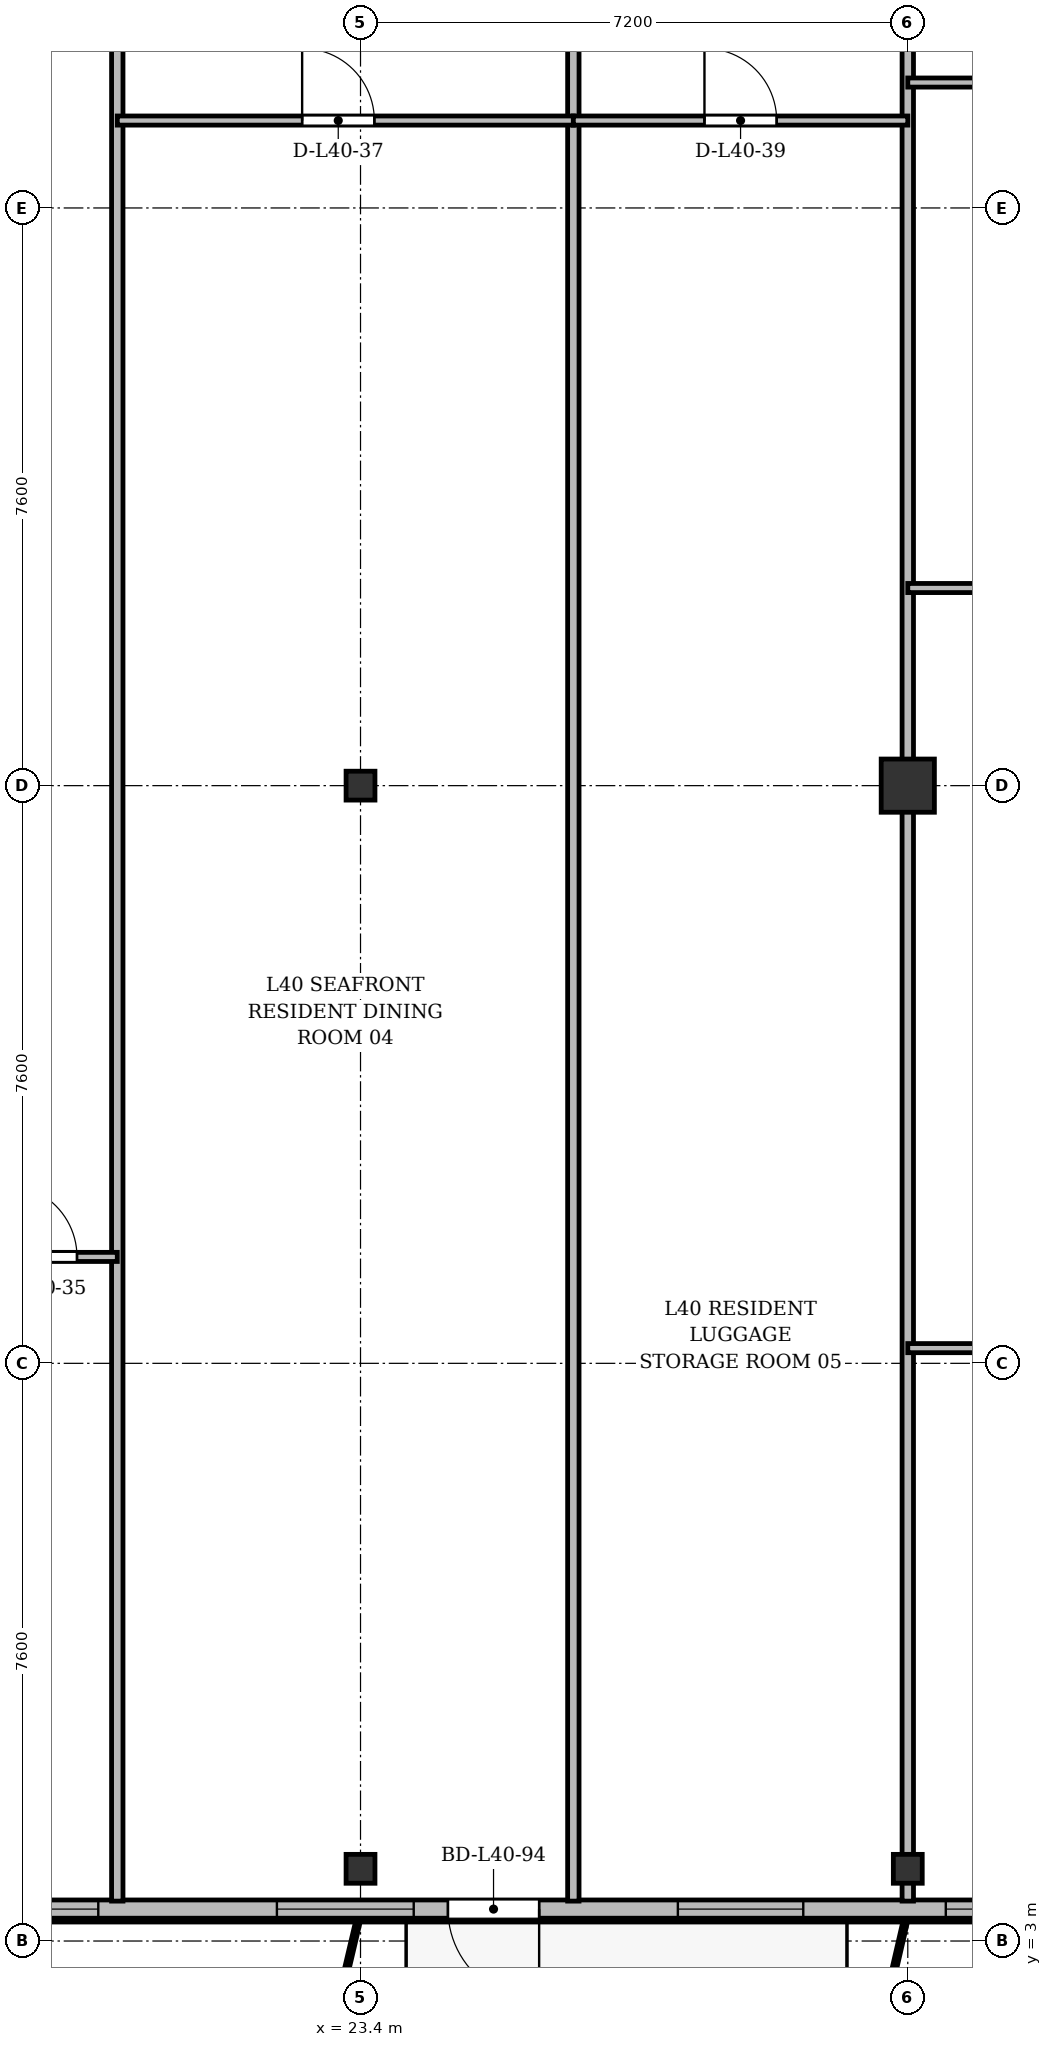
"""IFC4 building model, lengths in metres.
Left out: names, types, materials, properties, quantities, classifications, styles, units other than length and angle.
Written with IfcOpenShell. Run it as: python <this file> out.ifc"""

import sys

from ifc_helpers import new_model, si_unit, direction, frame, frame_2d, origin, origin_2d, place, context, subcontext, project, spatial, rectangle, i_section, extrude, source, transform, mapped, element, fill, save


model = new_model("IFC4")
c1 = context("Model", 3, precision=1e-05, world=origin(), true_north=direction((0.0, 1.0)))
c2 = subcontext(c1, "Body", "Model", "MODEL_VIEW")
j1 = project(units=[si_unit("LENGTHUNIT", "METRE"), si_unit("PLANEANGLEUNIT", "RADIAN")], contexts=[c1])
p1 = place(None, origin())
s1 = spatial("IfcSite", under=j1, at=p1, CompositionType="ELEMENT")
p2 = place(p1, origin())
s2 = spatial("IfcBuilding", under=s1, at=p2, CompositionType="ELEMENT")
p3 = place(p2, frame((0.0, 0.0, 153.7)))
s3 = spatial("IfcBuildingStorey", under=s2, at=p3, CompositionType="ELEMENT", Elevation=153.7)
m1 = source(origin(), c2, "Body", "SweptSolid", [
    extrude(i_section(OverallWidth=0.38, OverallDepth=0.38, WebThickness=0.02, FlangeThickness=0.03, at=origin_2d()), origin(), (0.0, 0.0, 1.0), 3.6),
])
for number, where, z_axis, x_axis in (
    (1, (23.4, 3.95, 0.0), (0.0, 0.0, 1.0), (1.0, 0.0, 0.0)),
    (2, (23.4, 18.2, 0.0), (0.0, 0.0, 1.0), (1.0, 0.0, 0.0)),
    (3, (30.6, 3.95, 0.0), (0.0, 0.0, 1.0), (1.0, 0.0, 0.0)),
):
    element("IfcColumn", number, at=place(p3, frame(where, z_axis=z_axis, x_axis=x_axis)), inside=s3, PredefinedType="COLUMN", context=c2, shape_type="MappedRepresentation", body=[
        mapped(m1, transform((0.0, 0.0, 0.0), x_axis=(1.0, 0.0, 0.0), y_axis=(0.0, 1.0, 0.0), z_axis=(0.0, 0.0, 1.0), scale=1.0)),
    ])
m2 = source(origin(), c2, "Body", "SweptSolid", [
    extrude(rectangle(XDim=0.7, YDim=0.7, at=origin_2d()), origin(), (0.0, 0.0, 1.0), 3.6),
])
p4 = place(p3, frame((30.6, 18.2, 0.0), z_axis=(0.0, 0.0, 1.0), x_axis=(1.0, 0.0, 0.0)))
e4 = element("IfcColumn", 4, at=p4, inside=s3, PredefinedType="COLUMN", context=c2, shape_type="MappedRepresentation", body=[
    mapped(m2, transform((0.0, 0.0, 0.0), x_axis=(1.0, 0.0, 0.0), y_axis=(0.0, 1.0, 0.0), z_axis=(0.0, 0.0, 1.0), scale=1.0)),
])
p5 = place(p3, frame((63.6, 3.42, 0.0), z_axis=(0.0, 0.0, 1.0), x_axis=(-1.0, 0.0, 0.0)))
e5 = element("IfcWall", 5, at=p5, inside=s3, PredefinedType="SOLIDWALL", context=c2, shape_type="SweptSolid", body=[
    extrude(rectangle(XDim=52.8, YDim=0.24, at=frame_2d((26.4, 0.0))), origin(), (0.0, 0.0, 1.0), 3.35),
])
p6 = place(p5, frame((0.295, 0.0, 0.9)))
e6 = element("IfcOpeningElement", 6, at=p6, cuts=e5, PredefinedType="OPENING", context=c2, shape_type="SweptSolid", body=[
    extrude(rectangle(XDim=1.5, YDim=1.75, at=frame_2d((0.75, 0.875))), frame((0.0, 0.13, 0.0), z_axis=(0.0, -1.0, 0.0), x_axis=(1.0, 0.0, 0.0)), (0.0, 0.0, 1.0), 0.26),
])
p7 = place(p5, frame((3.6, 0.0, 0.9)))
e7 = element("IfcOpeningElement", 7, at=p7, cuts=e5, PredefinedType="OPENING", context=c2, shape_type="SweptSolid", body=[
    extrude(rectangle(XDim=2.2, YDim=1.8, at=frame_2d((1.1, 0.9))), frame((0.0, 0.13, 0.0), z_axis=(0.0, -1.0, 0.0), x_axis=(1.0, 0.0, 0.0)), (0.0, 0.0, 1.0), 0.26),
])
p8 = place(p5, frame((7.635, 0.0, 0.0)))
e8 = element("IfcOpeningElement", 8, at=p8, cuts=e5, PredefinedType="OPENING", context=c2, shape_type="SweptSolid", body=[
    extrude(rectangle(XDim=1.2, YDim=2.2, at=frame_2d((0.6, 1.1))), frame((0.0, 0.13, 0.0), z_axis=(0.0, -1.0, 0.0), x_axis=(1.0, 0.0, 0.0)), (0.0, 0.0, 1.0), 0.26),
])
p9 = place(p5, frame((9.6, 0.0, 0.9)))
e9 = element("IfcOpeningElement", 9, at=p9, cuts=e5, PredefinedType="OPENING", context=c2, shape_type="SweptSolid", body=[
    extrude(rectangle(XDim=2.0, YDim=1.95, at=frame_2d((1.0, 0.975))), frame((0.0, 0.13, 0.0), z_axis=(0.0, -1.0, 0.0), x_axis=(1.0, 0.0, 0.0)), (0.0, 0.0, 1.0), 0.26),
])
p10 = place(p5, frame((12.175, 0.0, 0.9)))
e10 = element("IfcOpeningElement", 10, at=p10, cuts=e5, PredefinedType="OPENING", context=c2, shape_type="SweptSolid", body=[
    extrude(rectangle(XDim=1.65, YDim=1.85, at=frame_2d((0.825, 0.925))), frame((0.0, 0.13, 0.0), z_axis=(0.0, -1.0, 0.0), x_axis=(1.0, 0.0, 0.0)), (0.0, 0.0, 1.0), 0.26),
])
p11 = place(p5, frame((16.1, 0.0, 0.9)))
e11 = element("IfcOpeningElement", 11, at=p11, cuts=e5, PredefinedType="OPENING", context=c2, shape_type="SweptSolid", body=[
    extrude(rectangle(XDim=1.8, YDim=1.8, at=frame_2d((0.9, 0.9))), frame((0.0, 0.13, 0.0), z_axis=(0.0, -1.0, 0.0), x_axis=(1.0, 0.0, 0.0)), (0.0, 0.0, 1.0), 0.26),
])
p12 = place(p5, frame((22.3, 0.0, 0.9)))
e12 = element("IfcOpeningElement", 12, at=p12, cuts=e5, PredefinedType="OPENING", context=c2, shape_type="SweptSolid", body=[
    extrude(rectangle(XDim=2.2, YDim=1.8, at=frame_2d((1.1, 0.9))), frame((0.0, 0.13, 0.0), z_axis=(0.0, -1.0, 0.0), x_axis=(1.0, 0.0, 0.0)), (0.0, 0.0, 1.0), 0.26),
])
p13 = place(p5, frame((27.75, 0.0, 0.9)))
e13 = element("IfcOpeningElement", 13, at=p13, cuts=e5, PredefinedType="OPENING", context=c2, shape_type="SweptSolid", body=[
    extrude(rectangle(XDim=1.5, YDim=1.75, at=frame_2d((0.75, 0.875))), frame((0.0, 0.13, 0.0), z_axis=(0.0, -1.0, 0.0), x_axis=(1.0, 0.0, 0.0)), (0.0, 0.0, 1.0), 0.26),
])
p14 = place(p5, frame((30.5, 0.0, 0.9)))
e14 = element("IfcOpeningElement", 14, at=p14, cuts=e5, PredefinedType="OPENING", context=c2, shape_type="SweptSolid", body=[
    extrude(rectangle(XDim=2.0, YDim=1.95, at=frame_2d((1.0, 0.975))), frame((0.0, 0.13, 0.0), z_axis=(0.0, -1.0, 0.0), x_axis=(1.0, 0.0, 0.0)), (0.0, 0.0, 1.0), 0.26),
])
p15 = place(p5, frame((34.375, 0.0, 0.9)))
e15 = element("IfcOpeningElement", 15, at=p15, cuts=e5, PredefinedType="OPENING", context=c2, shape_type="SweptSolid", body=[
    extrude(rectangle(XDim=1.65, YDim=1.85, at=frame_2d((0.825, 0.925))), frame((0.0, 0.13, 0.0), z_axis=(0.0, -1.0, 0.0), x_axis=(1.0, 0.0, 0.0)), (0.0, 0.0, 1.0), 0.26),
])
p16 = place(p5, frame((39.5, 0.0, 0.9)))
e16 = element("IfcOpeningElement", 16, at=p16, cuts=e5, PredefinedType="OPENING", context=c2, shape_type="SweptSolid", body=[
    extrude(rectangle(XDim=1.8, YDim=1.8, at=frame_2d((0.9, 0.9))), frame((0.0, 0.13, 0.0), z_axis=(0.0, -1.0, 0.0), x_axis=(1.0, 0.0, 0.0)), (0.0, 0.0, 1.0), 0.26),
])
p17 = place(p5, frame((43.65, 0.0, 0.9)))
e17 = element("IfcOpeningElement", 17, at=p17, cuts=e5, PredefinedType="OPENING", context=c2, shape_type="SweptSolid", body=[
    extrude(rectangle(XDim=1.5, YDim=1.75, at=frame_2d((0.75, 0.875))), frame((0.0, 0.13, 0.0), z_axis=(0.0, -1.0, 0.0), x_axis=(1.0, 0.0, 0.0)), (0.0, 0.0, 1.0), 0.26),
])
p18 = place(p5, frame((47.35, 0.0, 0.9)))
e18 = element("IfcOpeningElement", 18, at=p18, cuts=e5, PredefinedType="OPENING", context=c2, shape_type="SweptSolid", body=[
    extrude(rectangle(XDim=1.5, YDim=1.75, at=frame_2d((0.75, 0.875))), frame((0.0, 0.13, 0.0), z_axis=(0.0, -1.0, 0.0), x_axis=(1.0, 0.0, 0.0)), (0.0, 0.0, 1.0), 0.26),
])
p19 = place(p5, frame((51.005, 0.0, 0.9)))
e19 = element("IfcOpeningElement", 19, at=p19, cuts=e5, PredefinedType="OPENING", context=c2, shape_type="SweptSolid", body=[
    extrude(rectangle(XDim=1.5, YDim=1.75, at=frame_2d((0.75, 0.875))), frame((0.0, 0.13, 0.0), z_axis=(0.0, -1.0, 0.0), x_axis=(1.0, 0.0, 0.0)), (0.0, 0.0, 1.0), 0.26),
])
p20 = place(p5, frame((37.85, 0.0, 0.0)))
e20 = element("IfcOpeningElement", 20, at=p20, cuts=e5, PredefinedType="OPENING", context=c2, shape_type="SweptSolid", body=[
    extrude(rectangle(XDim=1.2, YDim=2.2, at=frame_2d((0.6, 1.1))), frame((0.0, 0.13, 0.0), z_axis=(0.0, -1.0, 0.0), x_axis=(1.0, 0.0, 0.0)), (0.0, 0.0, 1.0), 0.26),
])
p21 = place(p3, frame((26.2, 3.525, 0.0), z_axis=(0.0, 0.0, 1.0), x_axis=(0.0, 1.0, 0.0)))
e21 = element("IfcWall", 21, at=p21, inside=s3, PredefinedType="PARTITIONING", context=c2, shape_type="SweptSolid", body=[
    extrude(rectangle(XDim=27.275, YDim=0.15, at=frame_2d((13.638, 0.0))), origin(), (0.0, 0.0, 1.0), 2.75),
])
p22 = place(p3, frame((30.6, 3.525, 0.0), z_axis=(0.0, 0.0, 1.0), x_axis=(0.0, 1.0, 0.0)))
e22 = element("IfcWall", 22, at=p22, inside=s3, PredefinedType="PARTITIONING", context=c2, shape_type="SweptSolid", body=[
    extrude(rectangle(XDim=27.275, YDim=0.15, at=frame_2d((13.638, 0.0))), origin(), (0.0, 0.0, 1.0), 2.85),
])
p23 = place(p3, frame((20.2, 3.525, 0.0), z_axis=(0.0, 0.0, 1.0), x_axis=(0.0, 1.0, 0.0)))
e23 = element("IfcWall", 23, at=p23, inside=s3, PredefinedType="PARTITIONING", context=c2, shape_type="SweptSolid", body=[
    extrude(rectangle(XDim=27.275, YDim=0.15, at=frame_2d((13.638, 0.0))), origin(), (0.0, 0.0, 1.0), 2.75),
])
p24 = place(p3, frame((18.2, 12.0, 0.0), z_axis=(0.0, 0.0, 1.0), x_axis=(1.0, 0.0, 0.0)))
e24 = element("IfcWall", 24, at=p24, inside=s3, PredefinedType="PARTITIONING", context=c2, shape_type="SweptSolid", body=[
    extrude(rectangle(XDim=2.0, YDim=0.12, at=frame_2d((1.0, 0.0))), origin(), (0.0, 0.0, 1.0), 3.35),
])
p25 = place(p24, frame((0.52, 0.0, 0.0)))
e25 = element("IfcOpeningElement", 25, at=p25, cuts=e24, PredefinedType="OPENING", context=c2, shape_type="SweptSolid", body=[
    extrude(rectangle(XDim=0.95, YDim=2.15, at=frame_2d((0.475, 1.075))), frame((0.0, 0.07, 0.0), z_axis=(0.0, -1.0, 0.0), x_axis=(1.0, 0.0, 0.0)), (0.0, 0.0, 1.0), 0.14),
])
p26 = place(p3, frame((20.2, 26.95, 0.0), z_axis=(0.0, 0.0, 1.0), x_axis=(1.0, 0.0, 0.0)))
e26 = element("IfcWall", 26, at=p26, inside=s3, PredefinedType="PARTITIONING", context=c2, shape_type="SweptSolid", body=[
    extrude(rectangle(XDim=6.0, YDim=0.12, at=frame_2d((3.0, 0.0))), origin(), (0.0, 0.0, 1.0), 2.85),
])
p27 = place(p26, frame((2.432, 0.0, 0.0)))
e27 = element("IfcOpeningElement", 27, at=p27, cuts=e26, PredefinedType="OPENING", context=c2, shape_type="SweptSolid", body=[
    extrude(rectangle(XDim=0.95, YDim=2.15, at=frame_2d((0.475, 1.075))), frame((0.0, 0.07, 0.0), z_axis=(0.0, -1.0, 0.0), x_axis=(1.0, 0.0, 0.0)), (0.0, 0.0, 1.0), 0.14),
])
p28 = place(p3, frame((26.2, 26.95, 0.0), z_axis=(0.0, 0.0, 1.0), x_axis=(1.0, 0.0, 0.0)))
e28 = element("IfcWall", 28, at=p28, inside=s3, PredefinedType="PARTITIONING", context=c2, shape_type="SweptSolid", body=[
    extrude(rectangle(XDim=4.4, YDim=0.12, at=frame_2d((2.2, 0.0))), origin(), (0.0, 0.0, 1.0), 2.85),
])
p29 = place(p28, frame((1.725, 0.0, 0.0)))
e29 = element("IfcOpeningElement", 29, at=p29, cuts=e28, PredefinedType="OPENING", context=c2, shape_type="SweptSolid", body=[
    extrude(rectangle(XDim=0.95, YDim=2.15, at=frame_2d((0.475, 1.075))), frame((0.0, 0.07, 0.0), z_axis=(0.0, -1.0, 0.0), x_axis=(1.0, 0.0, 0.0)), (0.0, 0.0, 1.0), 0.14),
])
p30 = place(p3, frame((30.6, 20.8, 0.0), z_axis=(0.0, 0.0, 1.0), x_axis=(1.0, 0.0, 0.0)))
e30 = element("IfcWall", 30, at=p30, inside=s3, PredefinedType="PARTITIONING", context=c2, shape_type="SweptSolid", body=[
    extrude(rectangle(XDim=6.0, YDim=0.12, at=frame_2d((3.0, 0.0))), origin(), (0.0, 0.0, 1.0), 2.85),
])
p31 = place(p30, frame((2.432, 0.0, 0.0)))
e31 = element("IfcOpeningElement", 31, at=p31, cuts=e30, PredefinedType="OPENING", context=c2, shape_type="SweptSolid", body=[
    extrude(rectangle(XDim=0.95, YDim=2.15, at=frame_2d((0.475, 1.075))), frame((0.0, 0.07, 0.0), z_axis=(0.0, -1.0, 0.0), x_axis=(1.0, 0.0, 0.0)), (0.0, 0.0, 1.0), 0.14),
])
p32 = place(p3, frame((30.6, 27.45, 0.0), z_axis=(0.0, 0.0, 1.0), x_axis=(1.0, 0.0, 0.0)))
e32 = element("IfcWall", 32, at=p32, inside=s3, PredefinedType="PARTITIONING", context=c2, shape_type="SweptSolid", body=[
    extrude(rectangle(XDim=2.09, YDim=0.12, at=frame_2d((1.045, 0.0))), origin(), (0.0, 0.0, 1.0), 2.85),
])
p33 = place(p3, frame((30.6, 10.8, 0.0), z_axis=(0.0, 0.0, 1.0), x_axis=(1.0, 0.0, 0.0)))
e33 = element("IfcWall", 33, at=p33, inside=s3, PredefinedType="PARTITIONING", context=c2, shape_type="SweptSolid", body=[
    extrude(rectangle(XDim=3.0, YDim=0.12, at=frame_2d((1.5, 0.0))), origin(), (0.0, 0.0, 1.0), 2.85),
])
p34 = place(p33, frame((1.025, 0.0, 0.0)))
e34 = element("IfcOpeningElement", 34, at=p34, cuts=e33, PredefinedType="OPENING", context=c2, shape_type="SweptSolid", body=[
    extrude(rectangle(XDim=0.95, YDim=2.15, at=frame_2d((0.475, 1.075))), frame((0.0, 0.07, 0.0), z_axis=(0.0, -1.0, 0.0), x_axis=(1.0, 0.0, 0.0)), (0.0, 0.0, 1.0), 0.14),
])
m3 = source(origin(), c2, "Body", "SweptSolid", [
    extrude(rectangle(XDim=2.0, YDim=1.95, at=frame_2d((1.0, 0.975))), frame((0.0, 0.03, 0.0), z_axis=(0.0, -1.0, 0.0), x_axis=(1.0, 0.0, 0.0)), (0.0, 0.0, 1.0), 0.06),
])
p35 = place(p14, origin())
e35 = element("IfcWindow", 35, at=p35, inside=s3, PartitioningType="SINGLE_PANEL", PredefinedType="WINDOW", context=c2, shape_type="MappedRepresentation", body=[
    mapped(m3, transform((0.0, 0.0, 0.0), x_axis=(1.0, 0.0, 0.0), y_axis=(0.0, 1.0, 0.0), z_axis=(0.0, 0.0, 1.0), scale=1.0)),
])
fill(e14, e35)
m4 = source(origin(), c2, "Body", "SweptSolid", [
    extrude(rectangle(XDim=1.65, YDim=1.85, at=frame_2d((0.825, 0.925))), frame((0.0, 0.03, 0.0), z_axis=(0.0, -1.0, 0.0), x_axis=(1.0, 0.0, 0.0)), (0.0, 0.0, 1.0), 0.06),
])
p36 = place(p15, origin())
e36 = element("IfcWindow", 36, at=p36, inside=s3, PartitioningType="SINGLE_PANEL", PredefinedType="WINDOW", context=c2, shape_type="MappedRepresentation", body=[
    mapped(m4, transform((0.0, 0.0, 0.0), x_axis=(1.0, 0.0, 0.0), y_axis=(0.0, 1.0, 0.0), z_axis=(0.0, 0.0, 1.0), scale=1.0)),
])
fill(e15, e36)
m5 = source(origin(), c2, "Body", "SweptSolid", [
    extrude(rectangle(XDim=1.8, YDim=1.8, at=frame_2d((0.9, 0.9))), frame((0.0, 0.03, 0.0), z_axis=(0.0, -1.0, 0.0), x_axis=(1.0, 0.0, 0.0)), (0.0, 0.0, 1.0), 0.06),
])
p37 = place(p16, origin())
e37 = element("IfcWindow", 37, at=p37, inside=s3, PartitioningType="SINGLE_PANEL", PredefinedType="WINDOW", context=c2, shape_type="MappedRepresentation", body=[
    mapped(m5, transform((0.0, 0.0, 0.0), x_axis=(1.0, 0.0, 0.0), y_axis=(0.0, 1.0, 0.0), z_axis=(0.0, 0.0, 1.0), scale=1.0)),
])
fill(e16, e37)
m6 = source(origin(), c2, "Body", "SweptSolid", [
    extrude(rectangle(XDim=1.5, YDim=1.75, at=frame_2d((0.75, 0.875))), frame((0.0, 0.03, 0.0), z_axis=(0.0, -1.0, 0.0), x_axis=(1.0, 0.0, 0.0)), (0.0, 0.0, 1.0), 0.06),
])
p38 = place(p17, origin())
e38 = element("IfcWindow", 38, at=p38, inside=s3, PartitioningType="SINGLE_PANEL", PredefinedType="WINDOW", context=c2, shape_type="MappedRepresentation", body=[
    mapped(m6, transform((0.0, 0.0, 0.0), x_axis=(1.0, 0.0, 0.0), y_axis=(0.0, 1.0, 0.0), z_axis=(0.0, 0.0, 1.0), scale=1.0)),
])
fill(e17, e38)
m7 = source(origin(), c2, "Body", "SweptSolid", [
    extrude(rectangle(XDim=1.2, YDim=2.2, at=frame_2d((0.6, 1.1))), frame((0.0, 0.025, 0.0), z_axis=(0.0, -1.0, 0.0), x_axis=(1.0, 0.0, 0.0)), (0.0, 0.0, 1.0), 0.05),
])
p39 = place(p20, origin())
e39 = element("IfcDoor", 39, at=p39, inside=s3, OperationType="SINGLE_SWING_LEFT", PredefinedType="DOOR", context=c2, shape_type="MappedRepresentation", body=[
    mapped(m7, transform((0.0, 0.0, 0.0), x_axis=(1.0, 0.0, 0.0), y_axis=(0.0, 1.0, 0.0), z_axis=(0.0, 0.0, 1.0), scale=1.0)),
])
fill(e20, e39)
m8 = source(origin(), c2, "Body", "SweptSolid", [
    extrude(rectangle(XDim=0.95, YDim=2.15, at=frame_2d((0.475, 1.075))), frame((0.0, 0.025, 0.0), z_axis=(0.0, -1.0, 0.0), x_axis=(1.0, 0.0, 0.0)), (0.0, 0.0, 1.0), 0.05),
])
p40 = place(p25, origin())
e40 = element("IfcDoor", 40, at=p40, inside=s3, OperationType="SINGLE_SWING_LEFT", PredefinedType="DOOR", context=c2, shape_type="MappedRepresentation", body=[
    mapped(m8, transform((0.0, 0.0, 0.0), x_axis=(1.0, 0.0, 0.0), y_axis=(0.0, 1.0, 0.0), z_axis=(0.0, 0.0, 1.0), scale=1.0)),
])
fill(e25, e40)
p41 = place(p27, origin())
e41 = element("IfcDoor", 41, at=p41, inside=s3, OperationType="SINGLE_SWING_LEFT", PredefinedType="DOOR", context=c2, shape_type="MappedRepresentation", body=[
    mapped(m8, transform((0.0, 0.0, 0.0), x_axis=(1.0, 0.0, 0.0), y_axis=(0.0, 1.0, 0.0), z_axis=(0.0, 0.0, 1.0), scale=1.0)),
])
fill(e27, e41)
p42 = place(p29, origin())
e42 = element("IfcDoor", 42, at=p42, inside=s3, OperationType="SINGLE_SWING_LEFT", PredefinedType="DOOR", context=c2, shape_type="MappedRepresentation", body=[
    mapped(m8, transform((0.0, 0.0, 0.0), x_axis=(1.0, 0.0, 0.0), y_axis=(0.0, 1.0, 0.0), z_axis=(0.0, 0.0, 1.0), scale=1.0)),
])
fill(e29, e42)
save(model, sys.argv[1])
